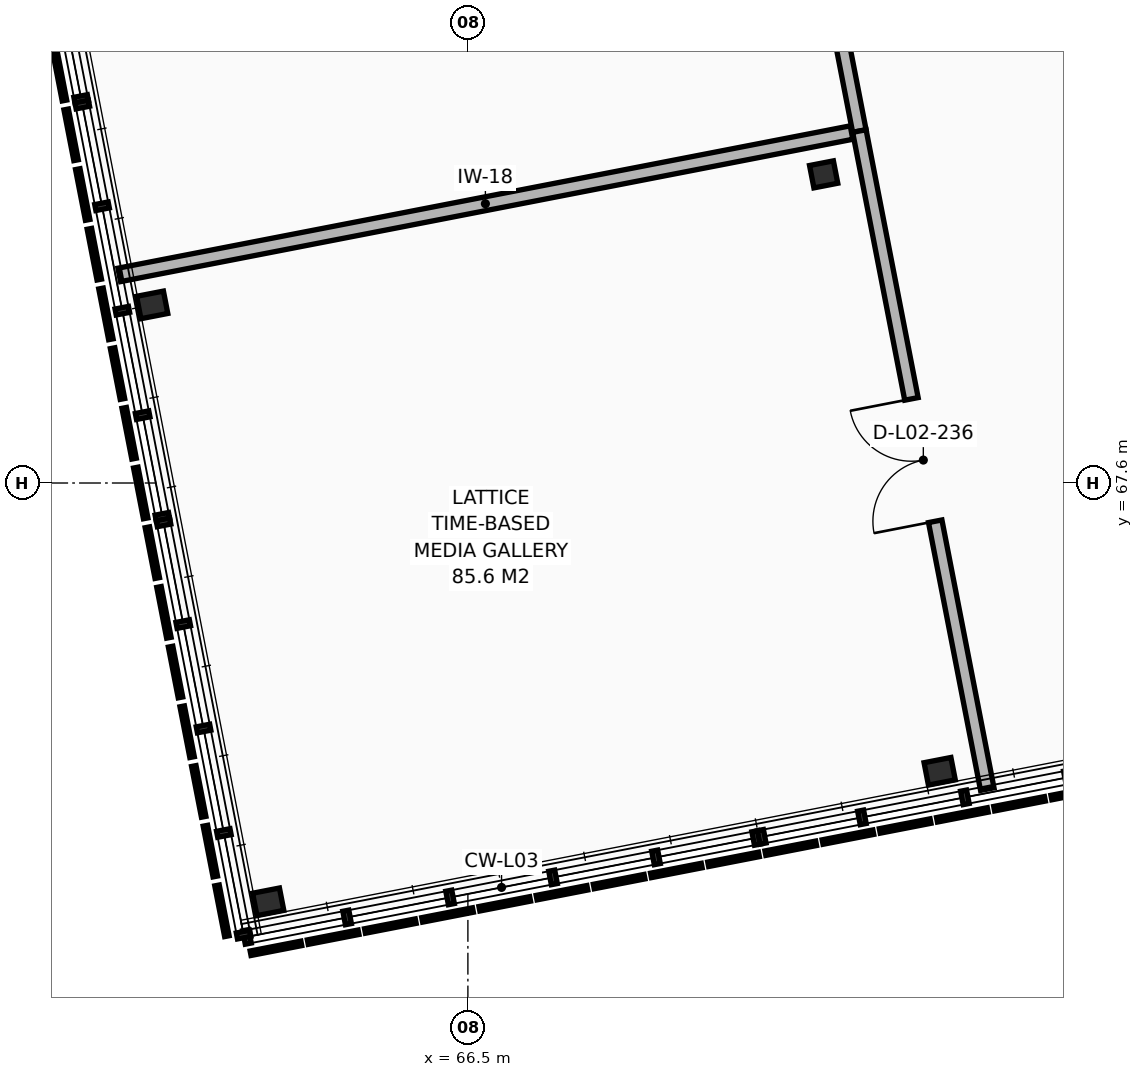
"""IFC4 building model, lengths in metres.
Left out: names, types, materials, properties, quantities, classifications, styles, units other than length and angle.
Written with IfcOpenShell. Run it as: python <this file> out.ifc"""

import sys

from ifc_helpers import new_model, si_unit, direction, frame, frame_2d, origin, origin_2d, place, context, subcontext, project, spatial, rectangle, i_section, extrude, element, fill, save


model = new_model("IFC4")
c1 = context("Model", 3, precision=1e-05, world=origin(), true_north=direction((0.0, 1.0)))
c2 = subcontext(c1, "Body", "Model", "MODEL_VIEW")
j1 = project(units=[si_unit("LENGTHUNIT", "METRE"), si_unit("PLANEANGLEUNIT", "RADIAN")], contexts=[c1])
p1 = place(None, origin())
s1 = spatial("IfcSite", under=j1, at=p1, CompositionType="ELEMENT")
p2 = place(p1, origin())
s2 = spatial("IfcBuilding", under=s1, at=p2, CompositionType="ELEMENT")
p3 = place(p2, frame((0.0, 0.0, 9.52)))
s3 = spatial("IfcBuildingStorey", under=s2, at=p3, CompositionType="ELEMENT", Elevation=9.52)
for number, where, z_axis, x_axis in (
    (1, (63.873, 62.09, 0.0), (0.0, 0.0, 1.0), (0.982, 0.191, 0.0)),
    (2, (62.346, 69.943, 0.0), (0.0, 0.0, 1.0), (0.982, 0.191, 0.0)),
    (3, (72.707, 63.807, 0.0), (0.0, 0.0, 1.0), (0.982, 0.191, 0.0)),
):
    element("IfcColumn", number, at=place(p3, frame(where, z_axis=z_axis, x_axis=x_axis)), inside=s3, PredefinedType="COLUMN", context=c2, shape_type="SweptSolid", body=[
        extrude(i_section(OverallWidth=0.3, OverallDepth=0.36, WebThickness=0.012, FlangeThickness=0.022, FilletRadius=0.027, at=origin_2d()), origin(), (0.0, 0.0, 1.0), 4.16),
    ])
p4 = place(p3, frame((71.181, 71.66, 0.0), z_axis=(0.0, 0.0, 1.0), x_axis=(0.981627183448, 0.190808995377, 0.0)))
e4 = element("IfcColumn", 4, at=p4, inside=s3, PredefinedType="COLUMN", context=c2, shape_type="SweptSolid", body=[
    extrude(i_section(OverallWidth=0.3, OverallDepth=0.32, WebThickness=0.011, FlangeThickness=0.021, FilletRadius=0.027, at=origin_2d()), origin(), (0.0, 0.0, 1.0), 4.16),
])
p5 = place(p3, frame((71.651, 72.23, 0.0), z_axis=(0.0, 0.0, 1.0), x_axis=(-0.190786732806, 0.981631510591, 0.0)))
e5 = element("IfcWall", 5, at=p5, inside=s3, PredefinedType="PARTITIONING", context=c2, shape_type="SweptSolid", body=[
    extrude(rectangle(XDim=7.88, YDim=0.18, at=frame_2d((3.94, 0.0))), origin(), (0.0, 0.0, 1.0), 3.55),
])
p6 = place(p5, frame((3.23, 0.0, 0.0)))
e6 = element("IfcOpeningElement", 6, at=p6, cuts=e5, PredefinedType="OPENING", context=c2, shape_type="SweptSolid", body=[
    extrude(rectangle(XDim=1.42, YDim=2.18, at=frame_2d((0.71, 1.09))), frame((0.0, 0.1, 0.0), z_axis=(0.0, -1.0, 0.0), x_axis=(1.0, 0.0, 0.0)), (0.0, 0.0, 1.0), 0.2),
])
p7 = place(p3, frame((73.333, 63.573, 0.0), z_axis=(0.0, 0.0, 1.0), x_axis=(-0.190805940679, 0.981627777216, 0.0)))
e7 = element("IfcWall", 7, at=p7, inside=s3, PredefinedType="PARTITIONING", context=c2, shape_type="SweptSolid", body=[
    extrude(rectangle(XDim=8.82, YDim=0.18, at=frame_2d((4.41, 0.0))), origin(), (0.0, 0.0, 1.0), 3.5),
])
p8 = place(p7, frame((3.59, 0.0, 0.0)))
e8 = element("IfcOpeningElement", 8, at=p8, cuts=e7, PredefinedType="OPENING", context=c2, shape_type="SweptSolid", body=[
    extrude(rectangle(XDim=1.64, YDim=2.2, at=frame_2d((0.82, 1.1))), frame((0.0, 0.1, 0.0), z_axis=(0.0, -1.0, 0.0), x_axis=(1.0, 0.0, 0.0)), (0.0, 0.0, 1.0), 0.2),
])
p9 = place(p3, frame((71.548, 72.21, 0.0), z_axis=(0.0, 0.0, 1.0), x_axis=(-0.981627297685, -0.190808407676, 0.0)))
e9 = element("IfcWall", 9, at=p9, inside=s3, PredefinedType="PARTITIONING", context=c2, shape_type="SweptSolid", body=[
    extrude(rectangle(XDim=9.815, YDim=0.18, at=frame_2d((4.908, 0.0))), origin(), (0.0, 0.0, 1.0), 3.55),
])
p10 = place(p8, origin())
e10 = element("IfcDoor", 10, at=p10, inside=s3, OperationType="DOUBLE_DOOR_SINGLE_SWING", PredefinedType="DOOR", context=c2, shape_type="SweptSolid", body=[
    extrude(rectangle(XDim=1.64, YDim=2.2, at=frame_2d((0.82, 1.1))), frame((0.0, 0.025, 0.0), z_axis=(0.0, -1.0, 0.0), x_axis=(1.0, 0.0, 0.0)), (0.0, 0.0, 1.0), 0.05),
])
fill(e8, e10)
save(model, sys.argv[1])
